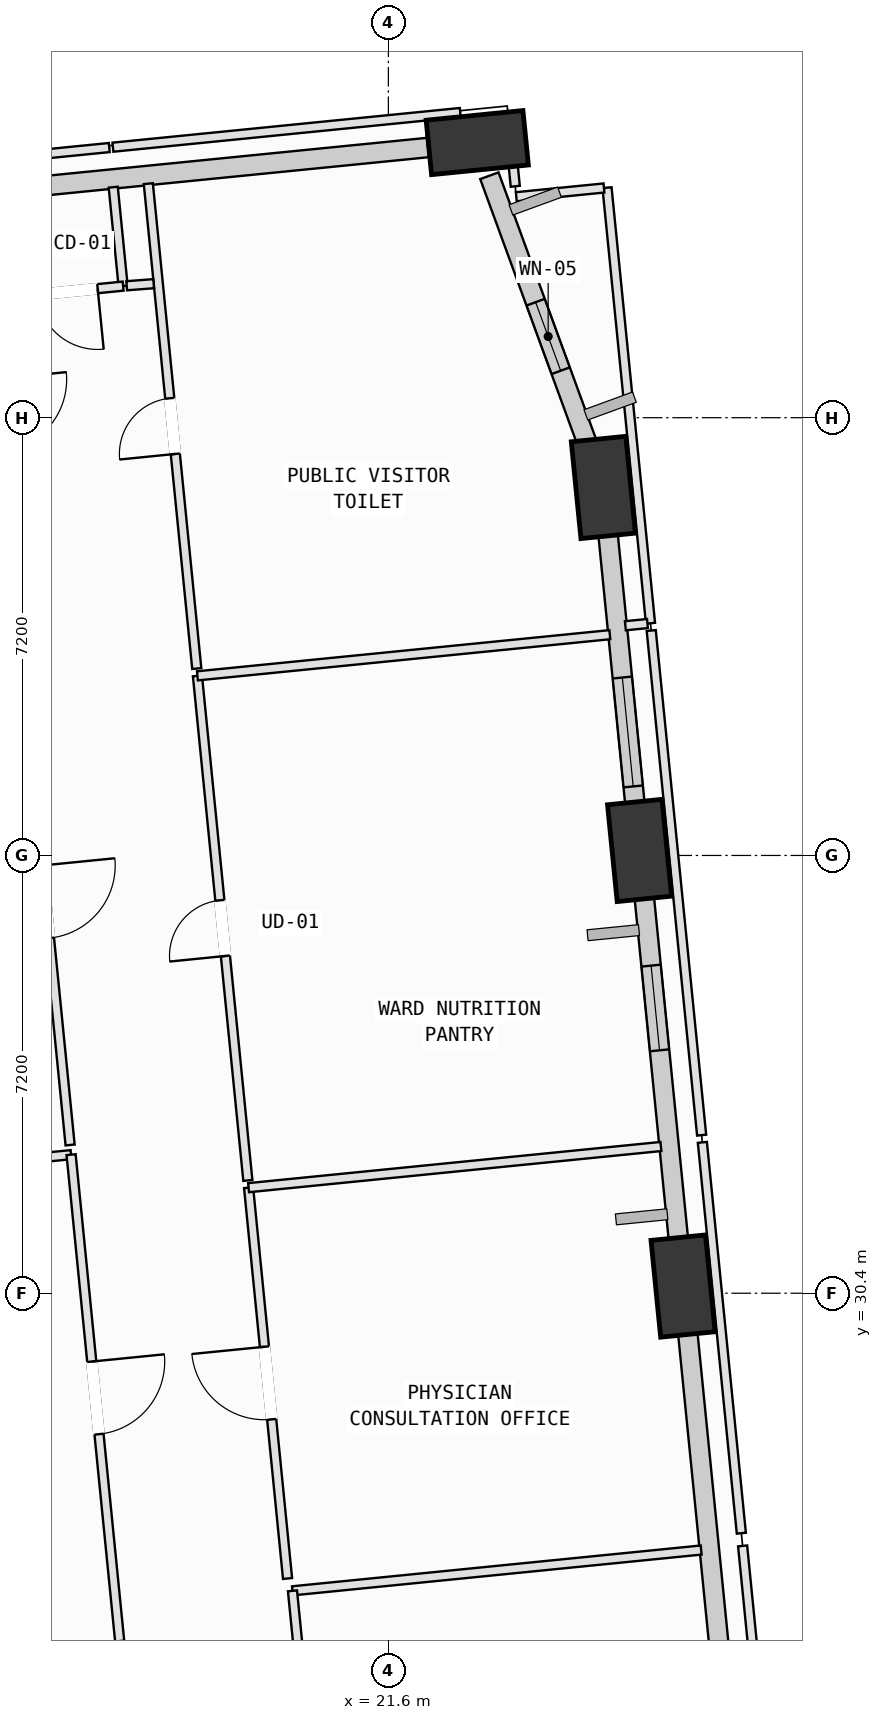
"""IFC4 building model, lengths in metres.
Left out: names, types, materials, properties, quantities, classifications, styles, units other than length and angle.
Written with IfcOpenShell. Run it as: python <this file> out.ifc"""

import sys

from ifc_helpers import new_model, si_unit, direction, frame, frame_2d, origin, origin_2d, place, context, subcontext, project, spatial, rectangle, extrude, element, fill, save


model = new_model("IFC4")
c1 = context("Model", 3, precision=1e-05, world=origin(), true_north=direction((0.0, 1.0)))
c2 = subcontext(c1, "Body", "Model", "MODEL_VIEW")
j1 = project(units=[si_unit("LENGTHUNIT", "METRE"), si_unit("PLANEANGLEUNIT", "RADIAN")], contexts=[c1])
p1 = place(None, origin())
s1 = spatial("IfcSite", under=j1, at=p1, CompositionType="ELEMENT")
p2 = place(p1, origin())
s2 = spatial("IfcBuilding", under=s1, at=p2, CompositionType="ELEMENT")
p3 = place(p2, frame((0.0, 0.0, 47.0)))
s3 = spatial("IfcBuildingStorey", under=s2, at=p3, CompositionType="ELEMENT", Elevation=47.0)
p4 = place(p3, frame((26.447, 30.518, 0.002), z_axis=(-0.023440642929, -0.02985019373, 0.99927949153), x_axis=(0.53599835428, 0.843373864942, 0.037766230177)))
e1 = element("IfcColumn", 1, at=p4, inside=s3, PredefinedType="COLUMN", context=c2, shape_type="SweptSolid", body=[
    extrude(rectangle(XDim=1.6, YDim=0.9, at=origin_2d()), origin(), (0.0, 0.0, 1.0), 4.0),
])
p5 = place(p3, frame((25.731, 37.682, 0.002), z_axis=(-0.052981428619, -0.032983835308, 0.998050617369), x_axis=(0.790594790674, 0.609182512333, 0.062101075887)))
e2 = element("IfcColumn", 2, at=p5, inside=s3, PredefinedType="COLUMN", context=c2, shape_type="SweptSolid", body=[
    extrude(rectangle(XDim=1.6, YDim=0.9, at=origin_2d()), origin(), (0.0, 0.0, 1.0), 4.004),
])
p6 = place(p3, frame((25.135, 43.653, 0.002), z_axis=(-0.077541471028, -0.035605777513, 0.996353124589), x_axis=(0.859535292838, 0.503974648786, 0.084903673342)))
e3 = element("IfcColumn", 3, at=p6, inside=s3, PredefinedType="COLUMN", context=c2, shape_type="SweptSolid", body=[
    extrude(rectangle(XDim=1.6, YDim=0.9, at=origin_2d()), origin(), (0.0, 0.0, 1.0), 4.011),
])
p7 = place(p3, frame((23.062, 49.324, 0.002), z_axis=(-0.100668818435, -0.044201990242, 0.993937610242), x_axis=(0.490435652814, -0.871408990752, 0.010919765858)))
e4 = element("IfcColumn", 4, at=p7, inside=s3, PredefinedType="COLUMN", context=c2, shape_type="SweptSolid", body=[
    extrude(rectangle(XDim=1.6, YDim=0.9, at=origin_2d()), origin(), (0.0, 0.0, 1.0), 4.021),
])
p8 = place(p3, frame((27.162, 23.357, 0.0), z_axis=(0.0, 0.0, 1.0), x_axis=(-0.099359482889, 0.995051603265, 0.0)))
e5 = element("IfcWall", 5, at=p8, inside=s3, PredefinedType="SOLIDWALL", context=c2, shape_type="SweptSolid", body=[
    extrude(rectangle(XDim=6.536, YDim=0.32, at=frame_2d((3.268, 0.0))), origin(), (0.0, 0.0, 1.0), 3.165),
])
p9 = place(p3, frame((26.392, 31.066, 0.0), z_axis=(0.0, 0.0, 1.0), x_axis=(-0.099342473641, 0.995053301553, 0.0)))
e6 = element("IfcWall", 6, at=p9, inside=s3, PredefinedType="SOLIDWALL", context=c2, shape_type="SweptSolid", body=[
    extrude(rectangle(XDim=5.996, YDim=0.32, at=frame_2d((2.998, 0.0))), origin(), (0.0, 0.0, 1.0), 3.165),
])
p10 = place(p9, frame((3.346, 0.0, 0.75)))
e7 = element("IfcOpeningElement", 7, at=p10, cuts=e6, PredefinedType="OPENING", context=c2, shape_type="SweptSolid", body=[
    extrude(rectangle(XDim=1.4, YDim=1.85, at=frame_2d((0.7, 0.925))), frame((0.0, 0.17, 0.0), z_axis=(0.0, -1.0, 0.0), x_axis=(1.0, 0.0, 0.0)), (0.0, 0.0, 1.0), 0.34),
])
p11 = place(p3, frame((25.678, 38.222, 0.0), z_axis=(0.0, 0.0, 1.0), x_axis=(-0.099302961989, 0.995057245459, 0.0)))
e8 = element("IfcWall", 8, at=p11, inside=s3, PredefinedType="SOLIDWALL", context=c2, shape_type="SweptSolid", body=[
    extrude(rectangle(XDim=4.816, YDim=0.32, at=frame_2d((2.408, 0.0))), origin(), (0.0, 0.0, 1.0), 3.165),
])
p12 = place(p11, frame((0.516, 0.0, 0.75)))
e9 = element("IfcOpeningElement", 9, at=p12, cuts=e8, PredefinedType="OPENING", context=c2, shape_type="SweptSolid", body=[
    extrude(rectangle(XDim=1.8, YDim=2.05, at=frame_2d((0.9, 1.025))), frame((0.0, 0.17, 0.0), z_axis=(0.0, -1.0, 0.0), x_axis=(1.0, 0.0, 0.0)), (0.0, 0.0, 1.0), 0.34),
])
p13 = place(p3, frame((23.261, 48.78, 0.0), z_axis=(0.0, 0.0, 1.0), x_axis=(0.34334628569, -0.939208884169, 0.0)))
e10 = element("IfcWall", 10, at=p13, inside=s3, PredefinedType="SOLIDWALL", context=c2, shape_type="SweptSolid", body=[
    extrude(rectangle(XDim=4.889, YDim=0.32, at=frame_2d((2.445, 0.0))), origin(), (0.0, 0.0, 1.0), 3.165),
])
p14 = place(p13, frame((2.215, 0.0, 0.75)))
e11 = element("IfcOpeningElement", 11, at=p14, cuts=e10, PredefinedType="OPENING", context=c2, shape_type="SweptSolid", body=[
    extrude(rectangle(XDim=1.2, YDim=1.75, at=frame_2d((0.6, 0.875))), frame((0.0, 0.17, 0.0), z_axis=(0.0, -1.0, 0.0), x_axis=(1.0, 0.0, 0.0)), (0.0, 0.0, 1.0), 0.34),
])
p15 = place(p3, frame((15.283, 48.548, 0.0), z_axis=(0.0, 0.0, 1.0), x_axis=(0.995052021169, 0.099355297633, 0.0)))
e12 = element("IfcWall", 12, at=p15, inside=s3, PredefinedType="SOLIDWALL", context=c2, shape_type="SweptSolid", body=[
    extrude(rectangle(XDim=7.003, YDim=0.32, at=frame_2d((3.501, 0.0))), origin(), (0.0, 0.0, 1.0), 3.165),
])
p16 = place(p3, frame((5.472, 31.59, 0.0), z_axis=(0.0, 0.0, 1.0), x_axis=(0.99505657203, 0.099309709794, 0.0)))
e13 = element("IfcWall", 13, at=p16, inside=s3, PredefinedType="PARTITIONING", context=c2, shape_type="SweptSolid", body=[
    extrude(rectangle(XDim=10.964, YDim=0.15, at=frame_2d((5.482, 0.0))), origin(), (0.0, 0.0, 1.0), 3.365),
])
p17 = place(p3, frame((16.382, 32.679, 0.0), z_axis=(0.0, 0.0, 1.0), x_axis=(0.099359401625, -0.995051611379, 0.0)))
e14 = element("IfcWall", 14, at=p17, inside=s3, PredefinedType="PARTITIONING", context=c2, shape_type="SweptSolid", body=[
    extrude(rectangle(XDim=8.04, YDim=0.15, at=frame_2d((4.02, 0.0))), origin(), (0.0, 0.0, 1.0), 3.78),
])
p18 = place(p17, frame((3.42, 0.0, 0.0)))
e15 = element("IfcOpeningElement", 15, at=p18, cuts=e14, PredefinedType="OPENING", context=c2, shape_type="SweptSolid", body=[
    extrude(rectangle(XDim=1.2, YDim=2.15, at=frame_2d((0.6, 1.075))), frame((0.0, 0.085, 0.0), z_axis=(0.0, -1.0, 0.0), x_axis=(1.0, 0.0, 0.0)), (0.0, 0.0, 1.0), 0.17),
])
p19 = place(p3, frame((15.568, 40.838, 0.0), z_axis=(0.0, 0.0, 1.0), x_axis=(0.099239132337, -0.99506361335, 0.0)))
e16 = element("IfcWall", 16, at=p19, inside=s3, PredefinedType="PARTITIONING", context=c2, shape_type="SweptSolid", body=[
    extrude(rectangle(XDim=8.04, YDim=0.15, at=frame_2d((4.02, 0.0))), origin(), (0.0, 0.0, 1.0), 3.78),
])
p20 = place(p19, frame((3.42, 0.0, 0.0)))
e17 = element("IfcOpeningElement", 17, at=p20, cuts=e16, PredefinedType="OPENING", context=c2, shape_type="SweptSolid", body=[
    extrude(rectangle(XDim=1.2, YDim=2.15, at=frame_2d((0.6, 1.075))), frame((0.0, 0.085, 0.0), z_axis=(0.0, -1.0, 0.0), x_axis=(1.0, 0.0, 0.0)), (0.0, 0.0, 1.0), 0.17),
])
p21 = place(p3, frame((20.023, 25.505, 0.0), z_axis=(0.0, 0.0, 1.0), x_axis=(0.995051137618, 0.099364146075, 0.0)))
e18 = element("IfcWall", 18, at=p21, inside=s3, PredefinedType="PARTITIONING", context=c2, shape_type="SweptSolid", body=[
    extrude(rectangle(XDim=6.754, YDim=0.15, at=frame_2d((3.377, 0.0))), origin(), (0.0, 0.0, 1.0), 3.78),
])
p22 = place(p3, frame((27.426, 26.244, 0.0), z_axis=(0.0, 0.0, 1.0), x_axis=(0.099283198449, -0.995059217587, 0.0)))
e19 = element("IfcWall", 19, at=p22, inside=s3, PredefinedType="PARTITIONING", context=c2, shape_type="SweptSolid", body=[
    extrude(rectangle(XDim=2.85, YDim=0.15, at=frame_2d((1.425, 0.0))), origin(), (0.0, 0.0, 1.0), 3.78),
])
p23 = place(p3, frame((20.514, 20.58, 0.0), z_axis=(0.0, 0.0, 1.0), x_axis=(-0.099200901867, 0.995067425388, 0.0)))
e20 = element("IfcWall", 20, at=p23, inside=s3, PredefinedType="PARTITIONING", context=c2, shape_type="SweptSolid", body=[
    extrude(rectangle(XDim=4.949, YDim=0.15, at=frame_2d((2.475, 0.0))), origin(), (0.0, 0.0, 1.0), 3.78),
])
p24 = place(p3, frame((19.942, 25.708, 0.0), z_axis=(0.0, 0.0, 1.0), x_axis=(-0.099208101616, 0.9950667076, 0.0)))
e21 = element("IfcWall", 21, at=p24, inside=s3, PredefinedType="PARTITIONING", context=c2, shape_type="SweptSolid", body=[
    extrude(rectangle(XDim=6.46, YDim=0.15, at=frame_2d((3.23, 0.0))), origin(), (0.0, 0.0, 1.0), 3.78),
])
p25 = place(p24, frame((2.63, 0.0, 0.0)))
e22 = element("IfcOpeningElement", 22, at=p25, cuts=e21, PredefinedType="OPENING", context=c2, shape_type="SweptSolid", body=[
    extrude(rectangle(XDim=1.2, YDim=2.15, at=frame_2d((0.6, 1.075))), frame((0.0, 0.085, 0.0), z_axis=(0.0, -1.0, 0.0), x_axis=(1.0, 0.0, 0.0)), (0.0, 0.0, 1.0), 0.17),
])
p26 = place(p3, frame((19.301, 32.136, 0.0), z_axis=(0.0, 0.0, 1.0), x_axis=(0.995053139262, 0.099344099196, 0.0)))
e23 = element("IfcWall", 23, at=p26, inside=s3, PredefinedType="PARTITIONING", context=c2, shape_type="SweptSolid", body=[
    extrude(rectangle(XDim=6.815, YDim=0.15, at=frame_2d((3.407, 0.0))), origin(), (0.0, 0.0, 1.0), 3.365),
])
p27 = place(p3, frame((26.764, 32.881, 0.0), z_axis=(0.0, 0.0, 1.0), x_axis=(0.099241790824, -0.995063348212, 0.0)))
e24 = element("IfcWall", 24, at=p27, inside=s3, PredefinedType="PARTITIONING", context=c2, shape_type="SweptSolid", body=[
    extrude(rectangle(XDim=6.46, YDim=0.15, at=frame_2d((3.23, 0.0))), origin(), (0.0, 0.0, 1.0), 3.78),
])
p28 = place(p3, frame((19.289, 32.255, 0.0), z_axis=(0.0, 0.0, 1.0), x_axis=(-0.099408077022, 0.995046749767, 0.0)))
e25 = element("IfcWall", 25, at=p28, inside=s3, PredefinedType="PARTITIONING", context=c2, shape_type="SweptSolid", body=[
    extrude(rectangle(XDim=8.34, YDim=0.15, at=frame_2d((4.17, 0.0))), origin(), (0.0, 0.0, 1.0), 3.78),
])
p29 = place(p28, frame((3.71, 0.0, 0.0)))
e26 = element("IfcOpeningElement", 26, at=p29, cuts=e25, PredefinedType="OPENING", context=c2, shape_type="SweptSolid", body=[
    extrude(rectangle(XDim=0.92, YDim=2.1, at=frame_2d((0.46, 1.05))), frame((0.0, 0.085, 0.0), z_axis=(0.0, -1.0, 0.0), x_axis=(1.0, 0.0, 0.0)), (0.0, 0.0, 1.0), 0.17),
])
p30 = place(p3, frame((18.46, 40.554, 0.0), z_axis=(0.0, 0.0, 1.0), x_axis=(0.995054553243, 0.099329935424, 0.0)))
e27 = element("IfcWall", 27, at=p30, inside=s3, PredefinedType="PARTITIONING", context=c2, shape_type="SweptSolid", body=[
    extrude(rectangle(XDim=6.816, YDim=0.15, at=frame_2d((3.408, 0.0))), origin(), (0.0, 0.0, 1.0), 3.78),
])
p31 = place(p3, frame((25.923, 41.299, 0.0), z_axis=(0.0, 0.0, 1.0), x_axis=(0.099379094054, -0.995049644824, 0.0)))
e28 = element("IfcWall", 28, at=p31, inside=s3, PredefinedType="PARTITIONING", context=c2, shape_type="SweptSolid", body=[
    extrude(rectangle(XDim=8.34, YDim=0.15, at=frame_2d((4.17, 0.0))), origin(), (0.0, 0.0, 1.0), 3.78),
])
p32 = place(p3, frame((25.196, 48.583, 0.0), z_axis=(0.0, 0.0, 1.0), x_axis=(0.099288840673, -0.995058654612, 0.0)))
e29 = element("IfcWall", 29, at=p32, inside=s3, PredefinedType="PARTITIONING", context=c2, shape_type="SweptSolid", body=[
    extrude(rectangle(XDim=7.2, YDim=0.15, at=frame_2d((3.6, 0.0))), origin(), (0.0, 0.0, 1.0), 3.78),
])
p33 = place(p3, frame((25.861, 41.414, 0.0), z_axis=(0.0, 0.0, 1.0), x_axis=(-0.99508346153, -0.099039914127, 0.0)))
e30 = element("IfcWall", 30, at=p33, inside=s3, PredefinedType="PARTITIONING", context=c2, shape_type="SweptSolid", body=[
    extrude(rectangle(XDim=0.365, YDim=0.15, at=frame_2d((0.182, 0.0))), origin(), (0.0, 0.0, 1.0), 3.78),
])
p34 = place(p3, frame((18.449, 40.674, 0.0), z_axis=(0.0, 0.0, 1.0), x_axis=(-0.09942831748, 0.995044727479, 0.0)))
e31 = element("IfcWall", 31, at=p34, inside=s3, PredefinedType="PARTITIONING", context=c2, shape_type="SweptSolid", body=[
    extrude(rectangle(XDim=8.015, YDim=0.15, at=frame_2d((4.007, 0.0))), origin(), (0.0, 0.0, 1.0), 3.78),
])
p35 = place(p34, frame((3.547, 0.0, 0.0)))
e32 = element("IfcOpeningElement", 32, at=p35, cuts=e31, PredefinedType="OPENING", context=c2, shape_type="SweptSolid", body=[
    extrude(rectangle(XDim=0.92, YDim=2.1, at=frame_2d((0.46, 1.05))), frame((0.0, 0.085, 0.0), z_axis=(0.0, -1.0, 0.0), x_axis=(1.0, 0.0, 0.0)), (0.0, 0.0, 1.0), 0.17),
])
p36 = place(p3, frame((22.233, 49.432, 0.0), z_axis=(0.0, 0.0, 1.0), x_axis=(0.995007039251, 0.099804768632, 0.0)))
e33 = element("IfcWall", 33, at=p36, inside=s3, PredefinedType="PARTITIONING", context=c2, shape_type="SweptSolid", body=[
    extrude(rectangle(XDim=1.365, YDim=0.15, at=frame_2d((0.683, 0.0))), origin(), (0.0, 0.0, 1.0), 3.165),
])
p37 = place(p3, frame((23.596, 49.518, 0.0), z_axis=(0.0, 0.0, 1.0), x_axis=(0.099345494906, -0.995052999916, 0.0)))
e34 = element("IfcWall", 34, at=p37, inside=s3, PredefinedType="PARTITIONING", context=c2, shape_type="SweptSolid", body=[
    extrude(rectangle(XDim=0.917, YDim=0.15, at=frame_2d((0.458, 0.0))), origin(), (0.0, 0.0, 1.0), 3.78),
])
p38 = place(p3, frame((23.704, 48.434, 0.0), z_axis=(0.0, 0.0, 1.0), x_axis=(0.995063844877, 0.099236810808, 0.0)))
e35 = element("IfcWall", 35, at=p38, inside=s3, PredefinedType="PARTITIONING", context=c2, shape_type="SweptSolid", body=[
    extrude(rectangle(XDim=1.449, YDim=0.15, at=frame_2d((0.725, 0.0))), origin(), (0.0, 0.0, 1.0), 3.78),
])
p39 = place(p3, frame((11.299, 48.673, 0.0), z_axis=(0.0, 0.0, 1.0), x_axis=(0.995059067084, 0.099284706847, 0.0)))
e36 = element("IfcWall", 36, at=p39, inside=s3, PredefinedType="PARTITIONING", context=c2, shape_type="SweptSolid", body=[
    extrude(rectangle(XDim=5.739, YDim=0.15, at=frame_2d((2.87, 0.0))), origin(), (0.0, 0.0, 1.0), 3.78),
])
p40 = place(p3, frame((17.075, 48.591, 0.0), z_axis=(0.0, 0.0, 1.0), x_axis=(0.099740249677, -0.99501350875, 0.0)))
e37 = element("IfcWall", 37, at=p40, inside=s3, PredefinedType="PARTITIONING", context=c2, shape_type="SweptSolid", body=[
    extrude(rectangle(XDim=1.635, YDim=0.15, at=frame_2d((0.817, 0.0))), origin(), (0.0, 0.0, 1.0), 3.78),
])
p41 = place(p3, frame((17.238, 46.964, 0.0), z_axis=(0.0, 0.0, 1.0), x_axis=(-0.995088233916, -0.098991952809, 0.0)))
e38 = element("IfcWall", 38, at=p41, inside=s3, PredefinedType="PARTITIONING", context=c2, shape_type="SweptSolid", body=[
    extrude(rectangle(XDim=2.173, YDim=0.15, at=frame_2d((1.086, 0.0))), origin(), (0.0, 0.0, 1.0), 3.78),
])
p42 = place(p41, frame((0.421, 0.0, 0.0)))
e39 = element("IfcOpeningElement", 39, at=p42, cuts=e38, PredefinedType="OPENING", context=c2, shape_type="SweptSolid", body=[
    extrude(rectangle(XDim=1.0, YDim=2.12, at=frame_2d((0.5, 1.06))), frame((0.0, 0.085, 0.0), z_axis=(0.0, -1.0, 0.0), x_axis=(1.0, 0.0, 0.0)), (0.0, 0.0, 1.0), 0.17),
])
p43 = place(p3, frame((17.74, 47.004, 0.0), z_axis=(0.0, 0.0, 1.0), x_axis=(-0.997077075008, -0.0764022676, 0.0)))
e40 = element("IfcWall", 40, at=p43, inside=s3, PredefinedType="PARTITIONING", context=c2, shape_type="SweptSolid", body=[
    extrude(rectangle(XDim=0.444, YDim=0.15, at=frame_2d((0.222, 0.0))), origin(), (0.0, 0.0, 1.0), 3.78),
])
p44 = place(p3, frame((17.07, 49.249, 0.0), z_axis=(0.0, 0.0, 1.0), x_axis=(0.995056541935, 0.099310011345, 0.0)))
e41 = element("IfcWall", 41, at=p44, inside=s3, PredefinedType="PARTITIONING", context=c2, shape_type="SweptSolid", body=[
    extrude(rectangle(XDim=5.74, YDim=0.15, at=frame_2d((2.87, 0.0))), origin(), (0.0, 0.0, 1.0), 3.78),
])
p45 = place(p10, origin())
e42 = element("IfcWindow", 42, at=p45, inside=s3, PartitioningType="SINGLE_PANEL", PredefinedType="WINDOW", context=c2, shape_type="SweptSolid", body=[
    extrude(rectangle(XDim=1.4, YDim=1.85, at=frame_2d((0.7, 0.925))), frame((0.0, 0.03, 0.0), z_axis=(0.0, -1.0, 0.0), x_axis=(1.0, 0.0, 0.0)), (0.0, 0.0, 1.0), 0.06),
])
fill(e7, e42)
p46 = place(p12, origin())
e43 = element("IfcWindow", 43, at=p46, inside=s3, PartitioningType="SINGLE_PANEL", PredefinedType="WINDOW", context=c2, shape_type="SweptSolid", body=[
    extrude(rectangle(XDim=1.8, YDim=2.05, at=frame_2d((0.9, 1.025))), frame((0.0, 0.03, 0.0), z_axis=(0.0, -1.0, 0.0), x_axis=(1.0, 0.0, 0.0)), (0.0, 0.0, 1.0), 0.06),
])
fill(e9, e43)
p47 = place(p14, origin())
e44 = element("IfcWindow", 44, at=p47, inside=s3, PartitioningType="SINGLE_PANEL", PredefinedType="WINDOW", context=c2, shape_type="SweptSolid", body=[
    extrude(rectangle(XDim=1.2, YDim=1.75, at=frame_2d((0.6, 0.875))), frame((0.0, 0.03, 0.0), z_axis=(0.0, -1.0, 0.0), x_axis=(1.0, 0.0, 0.0)), (0.0, 0.0, 1.0), 0.06),
])
fill(e11, e44)
p48 = place(p18, origin())
e45 = element("IfcDoor", 45, at=p48, inside=s3, OperationType="SINGLE_SWING_LEFT", PredefinedType="DOOR", context=c2, shape_type="SweptSolid", body=[
    extrude(rectangle(XDim=1.2, YDim=2.15, at=frame_2d((0.6, 1.075))), frame((0.0, 0.025, 0.0), z_axis=(0.0, -1.0, 0.0), x_axis=(1.0, 0.0, 0.0)), (0.0, 0.0, 1.0), 0.05),
])
fill(e15, e45)
p49 = place(p25, origin())
e46 = element("IfcDoor", 46, at=p49, inside=s3, OperationType="SINGLE_SWING_RIGHT", PredefinedType="DOOR", context=c2, shape_type="SweptSolid", body=[
    extrude(rectangle(XDim=1.2, YDim=2.15, at=frame_2d((0.6, 1.075))), frame((0.0, 0.025, 0.0), z_axis=(0.0, -1.0, 0.0), x_axis=(1.0, 0.0, 0.0)), (0.0, 0.0, 1.0), 0.05),
])
fill(e22, e46)
p50 = place(p29, origin())
e47 = element("IfcDoor", 47, at=p50, inside=s3, OperationType="SINGLE_SWING_LEFT", PredefinedType="DOOR", context=c2, shape_type="SweptSolid", body=[
    extrude(rectangle(XDim=0.92, YDim=2.1, at=frame_2d((0.46, 1.05))), frame((0.0, 0.025, 0.0), z_axis=(0.0, -1.0, 0.0), x_axis=(1.0, 0.0, 0.0)), (0.0, 0.0, 1.0), 0.05),
])
fill(e26, e47)
p51 = place(p35, origin())
e48 = element("IfcDoor", 48, at=p51, inside=s3, OperationType="SINGLE_SWING_LEFT", PredefinedType="DOOR", context=c2, shape_type="SweptSolid", body=[
    extrude(rectangle(XDim=0.92, YDim=2.1, at=frame_2d((0.46, 1.05))), frame((0.0, 0.025, 0.0), z_axis=(0.0, -1.0, 0.0), x_axis=(1.0, 0.0, 0.0)), (0.0, 0.0, 1.0), 0.05),
])
fill(e32, e48)
p52 = place(p42, origin())
e49 = element("IfcDoor", 49, at=p52, inside=s3, OperationType="SINGLE_SWING_LEFT", PredefinedType="DOOR", context=c2, shape_type="SweptSolid", body=[
    extrude(rectangle(XDim=1.0, YDim=2.12, at=frame_2d((0.5, 1.06))), frame((0.0, 0.025, 0.0), z_axis=(0.0, -1.0, 0.0), x_axis=(1.0, 0.0, 0.0)), (0.0, 0.0, 1.0), 0.05),
])
fill(e39, e49)
save(model, sys.argv[1])
